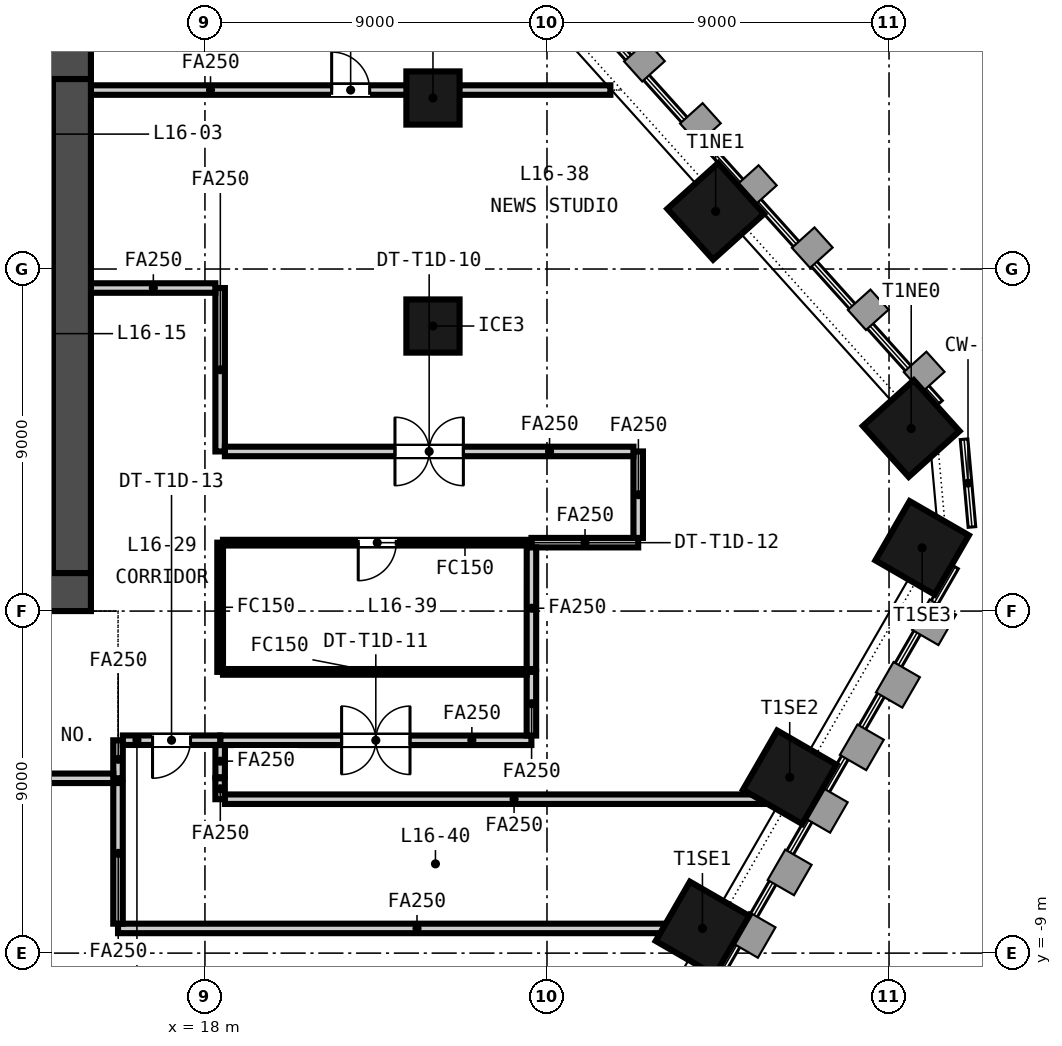
"""IFC4 building model, lengths in metres.
Left out: names, types, materials, properties, quantities, classifications, styles, units other than length and angle.
Written with IfcOpenShell. Run it as: python <this file> out.ifc"""

import sys

from ifc_helpers import new_model, si_unit, direction, frame, frame_2d, origin, origin_2d, place, context, subcontext, project, spatial, rectangle, extrude, element, fill, save


model = new_model("IFC4")
c1 = context("Model", 3, precision=1e-05, world=origin(), true_north=direction((0.0, 1.0)))
c2 = subcontext(c1, "Body", "Model", "MODEL_VIEW")
j1 = project(units=[si_unit("LENGTHUNIT", "METRE"), si_unit("PLANEANGLEUNIT", "RADIAN")], contexts=[c1])
p1 = place(None, origin())
s1 = spatial("IfcSite", under=j1, at=p1, CompositionType="ELEMENT")
p2 = place(p1, origin())
s2 = spatial("IfcBuilding", under=s1, at=p2, CompositionType="ELEMENT")
p3 = place(p2, frame((0.0, 0.0, 72.5)))
s3 = spatial("IfcBuildingStorey", under=s2, at=p3, CompositionType="ELEMENT", Elevation=72.5)
p4 = place(p3, frame((-15.0, 0.5, -0.15), z_axis=(0.0, 0.0, 1.0), x_axis=(1.0, 0.0, 0.0)))
e1 = element("IfcWall", 1, at=p4, inside=s3, PredefinedType="SOLIDWALL", context=c2, shape_type="SweptSolid", body=[
    extrude(rectangle(XDim=30.0, YDim=1.0, at=frame_2d((15.0, 0.0))), origin(), (0.0, 0.0, 1.0), 3.5),
])
p5 = place(p4, frame((5.8, 0.0, 0.15)))
e2 = element("IfcOpeningElement", 2, at=p5, cuts=e1, PredefinedType="OPENING", context=c2, shape_type="SweptSolid", body=[
    extrude(rectangle(XDim=2.4, YDim=2.4, at=frame_2d((1.2, 1.2))), frame((0.0, 0.51, 0.0), z_axis=(0.0, -1.0, 0.0), x_axis=(1.0, 0.0, 0.0)), (0.0, 0.0, 1.0), 1.02),
])
p6 = place(p4, frame((13.8, 0.0, 0.15)))
e3 = element("IfcOpeningElement", 3, at=p6, cuts=e1, PredefinedType="OPENING", context=c2, shape_type="SweptSolid", body=[
    extrude(rectangle(XDim=2.4, YDim=2.4, at=frame_2d((1.2, 1.2))), frame((0.0, 0.51, 0.0), z_axis=(0.0, -1.0, 0.0), x_axis=(1.0, 0.0, 0.0)), (0.0, 0.0, 1.0), 1.02),
])
p7 = place(p4, frame((21.8, 0.0, 0.15)))
e4 = element("IfcOpeningElement", 4, at=p7, cuts=e1, PredefinedType="OPENING", context=c2, shape_type="SweptSolid", body=[
    extrude(rectangle(XDim=2.4, YDim=2.4, at=frame_2d((1.2, 1.2))), frame((0.0, 0.51, 0.0), z_axis=(0.0, -1.0, 0.0), x_axis=(1.0, 0.0, 0.0)), (0.0, 0.0, 1.0), 1.02),
])
p8 = place(p4, frame((1.5, 0.0, 0.15)))
e5 = element("IfcOpeningElement", 5, at=p8, cuts=e1, PredefinedType="OPENING", context=c2, shape_type="SweptSolid", body=[
    extrude(rectangle(XDim=1.2, YDim=2.1, at=frame_2d((0.6, 1.05))), frame((0.0, 0.51, 0.0), z_axis=(0.0, -1.0, 0.0), x_axis=(1.0, 0.0, 0.0)), (0.0, 0.0, 1.0), 1.02),
])
p9 = place(p4, frame((27.3, 0.0, 0.15)))
e6 = element("IfcOpeningElement", 6, at=p9, cuts=e1, PredefinedType="OPENING", context=c2, shape_type="SweptSolid", body=[
    extrude(rectangle(XDim=1.2, YDim=2.1, at=frame_2d((0.6, 1.05))), frame((0.0, 0.51, 0.0), z_axis=(0.0, -1.0, 0.0), x_axis=(1.0, 0.0, 0.0)), (0.0, 0.0, 1.0), 1.02),
])
p10 = place(p3, frame((-15.0, 14.5, -0.15), z_axis=(0.0, 0.0, 1.0), x_axis=(1.0, 0.0, 0.0)))
e7 = element("IfcWall", 7, at=p10, inside=s3, PredefinedType="SOLIDWALL", context=c2, shape_type="SweptSolid", body=[
    extrude(rectangle(XDim=30.0, YDim=1.0, at=frame_2d((15.0, 0.0))), origin(), (0.0, 0.0, 1.0), 3.5),
])
p11 = place(p10, frame((9.25, 0.0, 0.15)))
e8 = element("IfcOpeningElement", 8, at=p11, cuts=e7, PredefinedType="OPENING", context=c2, shape_type="SweptSolid", body=[
    extrude(rectangle(XDim=1.5, YDim=2.1, at=frame_2d((0.75, 1.05))), frame((0.0, 0.51, 0.0), z_axis=(0.0, -1.0, 0.0), x_axis=(1.0, 0.0, 0.0)), (0.0, 0.0, 1.0), 1.02),
])
p12 = place(p10, frame((19.4, 0.0, 0.15)))
e9 = element("IfcOpeningElement", 9, at=p12, cuts=e7, PredefinedType="OPENING", context=c2, shape_type="SweptSolid", body=[
    extrude(rectangle(XDim=1.5, YDim=2.1, at=frame_2d((0.75, 1.05))), frame((0.0, 0.51, 0.0), z_axis=(0.0, -1.0, 0.0), x_axis=(1.0, 0.0, 0.0)), (0.0, 0.0, 1.0), 1.02),
])
p13 = place(p10, frame((1.5, 0.0, 0.15)))
e10 = element("IfcOpeningElement", 10, at=p13, cuts=e7, PredefinedType="OPENING", context=c2, shape_type="SweptSolid", body=[
    extrude(rectangle(XDim=1.2, YDim=2.1, at=frame_2d((0.6, 1.05))), frame((0.0, 0.51, 0.0), z_axis=(0.0, -1.0, 0.0), x_axis=(1.0, 0.0, 0.0)), (0.0, 0.0, 1.0), 1.02),
])
p14 = place(p10, frame((27.3, 0.0, 0.15)))
e11 = element("IfcOpeningElement", 11, at=p14, cuts=e7, PredefinedType="OPENING", context=c2, shape_type="SweptSolid", body=[
    extrude(rectangle(XDim=1.2, YDim=2.1, at=frame_2d((0.6, 1.05))), frame((0.0, 0.51, 0.0), z_axis=(0.0, -1.0, 0.0), x_axis=(1.0, 0.0, 0.0)), (0.0, 0.0, 1.0), 1.02),
])
p15 = place(p3, frame((14.5, 1.0, -0.15), z_axis=(0.0, 0.0, 1.0), x_axis=(0.0, 1.0, 0.0)))
e12 = element("IfcWall", 12, at=p15, inside=s3, PredefinedType="SOLIDWALL", context=c2, shape_type="SweptSolid", body=[
    extrude(rectangle(XDim=13.0, YDim=1.0, at=frame_2d((6.5, 0.0))), origin(), (0.0, 0.0, 1.0), 3.5),
])
for number, where, z_axis, x_axis in (
    (13, (31.09, -8.35, -0.15), (0.0, 0.0, 1.0), (0.5, 0.866, 0.0)),
    (14, (33.387, -4.373, -0.15), (0.0, 0.0, 1.0), (0.5, 0.866, 0.0)),
    (15, (36.872, 1.663, -0.15), (0.0, 0.0, 1.0), (0.5, 0.866, 0.0)),
    (16, (36.584, 4.803, -0.15), (0.0, 0.0, 1.0), (-0.669, 0.743, 0.0)),
    (17, (31.438, 10.517, -0.15), (0.0, 0.0, 1.0), (-0.669, 0.743, 0.0)),
):
    element("IfcColumn", number, at=place(p3, frame(where, z_axis=z_axis, x_axis=x_axis)), inside=s3, PredefinedType="COLUMN", context=c2, shape_type="SweptSolid", body=[
        extrude(rectangle(XDim=1.8, YDim=1.8, at=origin_2d()), origin(), (0.0, 0.0, 1.0), 3.5),
    ])
for number, where, z_axis, x_axis in (
    (18, (24.0, 7.5, -0.15), (0.0, 0.0, 1.0), (1.0, 0.0, 0.0)),
    (19, (24.0, 13.5, -0.15), (0.0, 0.0, 1.0), (1.0, 0.0, 0.0)),
):
    element("IfcColumn", number, at=place(p3, frame(where, z_axis=z_axis, x_axis=x_axis)), inside=s3, PredefinedType="COLUMN", context=c2, shape_type="SweptSolid", body=[
        extrude(rectangle(XDim=1.4, YDim=1.4, at=origin_2d()), origin(), (0.0, 0.0, 1.0), 3.5),
    ])
p16 = place(p3, frame((11.05, 7.35, -0.15), z_axis=(0.0, 0.0, 1.0), x_axis=(1.0, 0.0, 0.0)))
e20 = element("IfcWall", 20, at=p16, inside=s3, PredefinedType="SOLIDWALL", context=c2, shape_type="SweptSolid", body=[
    extrude(rectangle(XDim=2.95, YDim=0.3, at=frame_2d((1.475, 0.0))), origin(), (0.0, 0.0, 1.0), 3.5),
])
p17 = place(p3, frame((15.713, -3.4, 0.0), z_axis=(0.0, 0.0, 1.0), x_axis=(0.0, -1.0, 0.0)))
e21 = element("IfcWall", 21, at=p17, inside=s3, PredefinedType="PARTITIONING", context=c2, shape_type="SweptSolid", body=[
    extrude(rectangle(XDim=1.0, YDim=0.25, at=frame_2d((0.5, 0.0))), origin(), (0.0, 0.0, 1.0), 2.591),
])
p18 = place(p3, frame((15.588, -4.4, 0.0), z_axis=(0.0, 0.0, 1.0), x_axis=(-1.0, 0.0, 0.0)))
e22 = element("IfcWall", 22, at=p18, inside=s3, PredefinedType="PARTITIONING", context=c2, shape_type="SweptSolid", body=[
    extrude(rectangle(XDim=30.563, YDim=0.25, at=frame_2d((15.281, 0.0))), origin(), (0.0, 0.0, 1.0), 2.591),
])
p19 = place(p18, frame((14.394, 0.0, 0.0)))
e23 = element("IfcOpeningElement", 23, at=p19, cuts=e22, PredefinedType="OPENING", context=c2, shape_type="SweptSolid", body=[
    extrude(rectangle(XDim=1.8, YDim=2.1, at=frame_2d((0.9, 1.05))), frame((0.0, 0.135, 0.0), z_axis=(0.0, -1.0, 0.0), x_axis=(1.0, 0.0, 0.0)), (0.0, 0.0, 1.0), 0.27),
])
p20 = place(p3, frame((18.4, 8.5, 0.0), z_axis=(0.0, 0.0, 1.0), x_axis=(0.0, -1.0, 0.0)))
e24 = element("IfcWall", 24, at=p20, inside=s3, PredefinedType="PARTITIONING", context=c2, shape_type="SweptSolid", body=[
    extrude(rectangle(XDim=4.3, YDim=0.25, at=frame_2d((2.15, 0.0))), origin(), (0.0, 0.0, 1.0), 2.591),
])
p21 = place(p3, frame((26.59, -3.4, 0.0), z_axis=(0.0, 0.0, 1.0), x_axis=(-1.0, 0.0, 0.0)))
e25 = element("IfcWall", 25, at=p21, inside=s3, PredefinedType="PARTITIONING", context=c2, shape_type="SweptSolid", body=[
    extrude(rectangle(XDim=8.188, YDim=0.25, at=frame_2d((4.094, 0.0))), origin(), (0.0, 0.0, 1.0), 2.591),
])
p22 = place(p21, frame((3.194, 0.0, 0.0)))
e26 = element("IfcOpeningElement", 26, at=p22, cuts=e25, PredefinedType="OPENING", context=c2, shape_type="SweptSolid", body=[
    extrude(rectangle(XDim=1.8, YDim=2.1, at=frame_2d((0.9, 1.05))), frame((0.0, 0.135, 0.0), z_axis=(0.0, -1.0, 0.0), x_axis=(1.0, 0.0, 0.0)), (0.0, 0.0, 1.0), 0.27),
])
p23 = place(p3, frame((26.59, -1.6, 0.0), z_axis=(0.0, 0.0, 1.0), x_axis=(0.0, -1.0, 0.0)))
e27 = element("IfcWall", 27, at=p23, inside=s3, PredefinedType="PARTITIONING", context=c2, shape_type="SweptSolid", body=[
    extrude(rectangle(XDim=1.675, YDim=0.25, at=frame_2d((0.837, 0.0))), origin(), (0.0, 0.0, 1.0), 2.591),
])
p24 = place(p3, frame((29.4, 1.8, 0.0), z_axis=(0.0, 0.0, 1.0), x_axis=(-1.0, 0.0, 0.0)))
e28 = element("IfcWall", 28, at=p24, inside=s3, PredefinedType="PARTITIONING", context=c2, shape_type="SweptSolid", body=[
    extrude(rectangle(XDim=2.808, YDim=0.25, at=frame_2d((1.404, 0.0))), origin(), (0.0, 0.0, 1.0), 2.591),
])
p25 = place(p3, frame((29.4, 4.2, 0.0), z_axis=(0.0, 0.0, 1.0), x_axis=(0.0, -1.0, 0.0)))
e29 = element("IfcWall", 29, at=p25, inside=s3, PredefinedType="PARTITIONING", context=c2, shape_type="SweptSolid", body=[
    extrude(rectangle(XDim=2.275, YDim=0.25, at=frame_2d((1.137, 0.0))), origin(), (0.0, 0.0, 1.0), 2.591),
])
p26 = place(p3, frame((18.4, 1.8, 0.0), z_axis=(0.0, 0.0, 1.0), x_axis=(0.0, -1.0, 0.0)))
e30 = element("IfcWall", 30, at=p26, inside=s3, PredefinedType="PARTITIONING", context=c2, shape_type="SweptSolid", body=[
    extrude(rectangle(XDim=3.4, YDim=0.15, at=frame_2d((1.7, 0.0))), origin(), (0.0, 0.0, 1.0), 2.591),
])
p27 = place(p3, frame((26.592, 1.8, 0.0), z_axis=(0.0, 0.0, 1.0), x_axis=(-1.0, 0.0, 0.0)))
e31 = element("IfcWall", 31, at=p27, inside=s3, PredefinedType="PARTITIONING", context=c2, shape_type="SweptSolid", body=[
    extrude(rectangle(XDim=8.117, YDim=0.15, at=frame_2d((4.059, 0.0))), origin(), (0.0, 0.0, 1.0), 2.591),
])
p28 = place(p27, frame((3.559, 0.0, 0.0)))
e32 = element("IfcOpeningElement", 32, at=p28, cuts=e31, PredefinedType="OPENING", context=c2, shape_type="SweptSolid", body=[
    extrude(rectangle(XDim=1.0, YDim=2.1, at=frame_2d((0.5, 1.05))), frame((0.0, 0.085, 0.0), z_axis=(0.0, -1.0, 0.0), x_axis=(1.0, 0.0, 0.0)), (0.0, 0.0, 1.0), 0.17),
])
p29 = place(p3, frame((18.402, -3.398, 0.0), z_axis=(0.0, 0.0, 1.0), x_axis=(-1.0, 0.0, 0.0)))
e33 = element("IfcWall", 33, at=p29, inside=s3, PredefinedType="PARTITIONING", context=c2, shape_type="SweptSolid", body=[
    extrude(rectangle(XDim=2.562, YDim=0.25, at=frame_2d((1.281, 0.0))), origin(), (0.0, 0.0, 1.0), 2.591),
])
p30 = place(p29, frame((0.781, 0.0, 0.0)))
e34 = element("IfcOpeningElement", 34, at=p30, cuts=e33, PredefinedType="OPENING", context=c2, shape_type="SweptSolid", body=[
    extrude(rectangle(XDim=1.0, YDim=2.1, at=frame_2d((0.5, 1.05))), frame((0.0, 0.135, 0.0), z_axis=(0.0, -1.0, 0.0), x_axis=(1.0, 0.0, 0.0)), (0.0, 0.0, 1.0), 0.27),
])
p31 = place(p3, frame((15.0, 13.709, 0.0), z_axis=(0.0, 0.0, 1.0), x_axis=(1.0, 0.0, 0.0)))
e35 = element("IfcWall", 35, at=p31, inside=s3, PredefinedType="PARTITIONING", context=c2, shape_type="SweptSolid", body=[
    extrude(rectangle(XDim=13.668, YDim=0.25, at=frame_2d((6.834, 0.0))), origin(), (0.0, 0.0, 1.0), 2.591),
])
p32 = place(p31, frame((6.334, 0.0, 0.0)))
e36 = element("IfcOpeningElement", 36, at=p32, cuts=e35, PredefinedType="OPENING", context=c2, shape_type="SweptSolid", body=[
    extrude(rectangle(XDim=1.0, YDim=2.1, at=frame_2d((0.5, 1.05))), frame((0.0, 0.135, 0.0), z_axis=(0.0, -1.0, 0.0), x_axis=(1.0, 0.0, 0.0)), (0.0, 0.0, 1.0), 0.27),
])
p33 = place(p3, frame((15.0, 8.5, 0.0), z_axis=(0.0, 0.0, 1.0), x_axis=(1.0, 0.0, 0.0)))
e37 = element("IfcWall", 37, at=p33, inside=s3, PredefinedType="PARTITIONING", context=c2, shape_type="SweptSolid", body=[
    extrude(rectangle(XDim=3.275, YDim=0.25, at=frame_2d((1.637, 0.0))), origin(), (0.0, 0.0, 1.0), 2.591),
])
p34 = place(p3, frame((18.525, 4.2, 0.0), z_axis=(0.0, 0.0, 1.0), x_axis=(1.0, 0.0, 0.0)))
e38 = element("IfcWall", 38, at=p34, inside=s3, PredefinedType="PARTITIONING", context=c2, shape_type="SweptSolid", body=[
    extrude(rectangle(XDim=10.75, YDim=0.25, at=frame_2d((5.375, 0.0))), origin(), (0.0, 0.0, 1.0), 2.591),
])
p35 = place(p34, frame((4.475, 0.0, 0.0)))
e39 = element("IfcOpeningElement", 39, at=p35, cuts=e38, PredefinedType="OPENING", context=c2, shape_type="SweptSolid", body=[
    extrude(rectangle(XDim=1.8, YDim=2.1, at=frame_2d((0.9, 1.05))), frame((0.0, 0.135, 0.0), z_axis=(0.0, -1.0, 0.0), x_axis=(1.0, 0.0, 0.0)), (0.0, 0.0, 1.0), 0.27),
])
p36 = place(p3, frame((18.398, -4.4, 0.0), z_axis=(0.0, 0.0, 1.0), x_axis=(0.003550798743, -0.999993695894, 0.0)))
e40 = element("IfcWall", 40, at=p36, inside=s3, PredefinedType="PARTITIONING", context=c2, shape_type="SweptSolid", body=[
    extrude(rectangle(XDim=0.55, YDim=0.25, at=frame_2d((0.275, 0.0))), origin(), (0.0, 0.0, 1.0), 2.591),
])
p37 = place(p3, frame((18.525, -4.95, 0.0), z_axis=(0.0, 0.0, 1.0), x_axis=(1.0, 0.0, 0.0)))
e41 = element("IfcWall", 41, at=p37, inside=s3, PredefinedType="PARTITIONING", context=c2, shape_type="SweptSolid", body=[
    extrude(rectangle(XDim=15.208, YDim=0.25, at=frame_2d((7.604, 0.0))), origin(), (0.0, 0.0, 1.0), 2.591),
])
p38 = place(p3, frame((18.475, -1.6, 0.0), z_axis=(0.0, 0.0, 1.0), x_axis=(1.0, 0.0, 0.0)))
e42 = element("IfcWall", 42, at=p38, inside=s3, PredefinedType="PARTITIONING", context=c2, shape_type="SweptSolid", body=[
    extrude(rectangle(XDim=7.99, YDim=0.15, at=frame_2d((3.995, 0.0))), origin(), (0.0, 0.0, 1.0), 2.591),
])
p39 = place(p3, frame((26.59, -1.525, 0.0), z_axis=(0.0, 0.0, 1.0), x_axis=(0.00053406569, 0.999999857387, 0.0)))
e43 = element("IfcWall", 43, at=p39, inside=s3, PredefinedType="PARTITIONING", context=c2, shape_type="SweptSolid", body=[
    extrude(rectangle(XDim=3.2, YDim=0.25, at=frame_2d((1.6, 0.0))), origin(), (0.0, 0.0, 1.0), 2.591),
])
p40 = place(p3, frame((18.4, -4.372, 0.0), z_axis=(0.0, 0.0, 1.0), x_axis=(0.002017286962, 0.999997965275, 0.0)))
e44 = element("IfcWall", 44, at=p40, inside=s3, PredefinedType="PARTITIONING", context=c2, shape_type="SweptSolid", body=[
    extrude(rectangle(XDim=0.847, YDim=0.25, at=frame_2d((0.424, 0.0))), origin(), (0.0, 0.0, 1.0), 2.591),
])
p41 = place(p3, frame((15.713, -8.35, 0.0), z_axis=(0.0, 0.0, 1.0), x_axis=(1.0, 0.0, 0.0)))
e45 = element("IfcWall", 45, at=p41, inside=s3, PredefinedType="PARTITIONING", context=c2, shape_type="SweptSolid", body=[
    extrude(rectangle(XDim=15.724, YDim=0.25, at=frame_2d((7.862, 0.0))), origin(), (0.0, 0.0, 1.0), 2.591),
])
p42 = place(p3, frame((15.713, -4.525, 0.0), z_axis=(0.0, 0.0, 1.0), x_axis=(0.0, -1.0, 0.0)))
e46 = element("IfcWall", 46, at=p42, inside=s3, PredefinedType="PARTITIONING", context=c2, shape_type="SweptSolid", body=[
    extrude(rectangle(XDim=3.7, YDim=0.25, at=frame_2d((1.85, 0.0))), origin(), (0.0, 0.0, 1.0), 2.591),
])
p43 = place(p35, origin())
e47 = element("IfcDoor", 47, at=p43, inside=s3, OperationType="DOUBLE_DOOR_DOUBLE_SWING", PredefinedType="DOOR", context=c2, shape_type="SweptSolid", body=[
    extrude(rectangle(XDim=1.8, YDim=2.1, at=frame_2d((0.9, 1.05))), frame((0.0, 0.025, 0.0), z_axis=(0.0, -1.0, 0.0), x_axis=(1.0, 0.0, 0.0)), (0.0, 0.0, 1.0), 0.05),
])
fill(e39, e47)
p44 = place(p22, origin())
e48 = element("IfcDoor", 48, at=p44, inside=s3, OperationType="DOUBLE_DOOR_DOUBLE_SWING", PredefinedType="DOOR", context=c2, shape_type="SweptSolid", body=[
    extrude(rectangle(XDim=1.8, YDim=2.1, at=frame_2d((0.9, 1.05))), frame((0.0, 0.025, 0.0), z_axis=(0.0, -1.0, 0.0), x_axis=(1.0, 0.0, 0.0)), (0.0, 0.0, 1.0), 0.05),
])
fill(e26, e48)
p45 = place(p28, origin())
e49 = element("IfcDoor", 49, at=p45, inside=s3, OperationType="SINGLE_SWING_RIGHT", PredefinedType="DOOR", context=c2, shape_type="SweptSolid", body=[
    extrude(rectangle(XDim=1.0, YDim=2.1, at=frame_2d((0.5, 1.05))), frame((0.0, 0.025, 0.0), z_axis=(0.0, -1.0, 0.0), x_axis=(1.0, 0.0, 0.0)), (0.0, 0.0, 1.0), 0.05),
])
fill(e32, e49)
p46 = place(p30, origin())
e50 = element("IfcDoor", 50, at=p46, inside=s3, OperationType="SINGLE_SWING_RIGHT", PredefinedType="DOOR", context=c2, shape_type="SweptSolid", body=[
    extrude(rectangle(XDim=1.0, YDim=2.1, at=frame_2d((0.5, 1.05))), frame((0.0, 0.025, 0.0), z_axis=(0.0, -1.0, 0.0), x_axis=(1.0, 0.0, 0.0)), (0.0, 0.0, 1.0), 0.05),
])
fill(e34, e50)
p47 = place(p32, origin())
e51 = element("IfcDoor", 51, at=p47, inside=s3, OperationType="SINGLE_SWING_LEFT", PredefinedType="DOOR", context=c2, shape_type="SweptSolid", body=[
    extrude(rectangle(XDim=1.0, YDim=2.1, at=frame_2d((0.5, 1.05))), frame((0.0, 0.025, 0.0), z_axis=(0.0, -1.0, 0.0), x_axis=(1.0, 0.0, 0.0)), (0.0, 0.0, 1.0), 0.05),
])
fill(e36, e51)
save(model, sys.argv[1])
